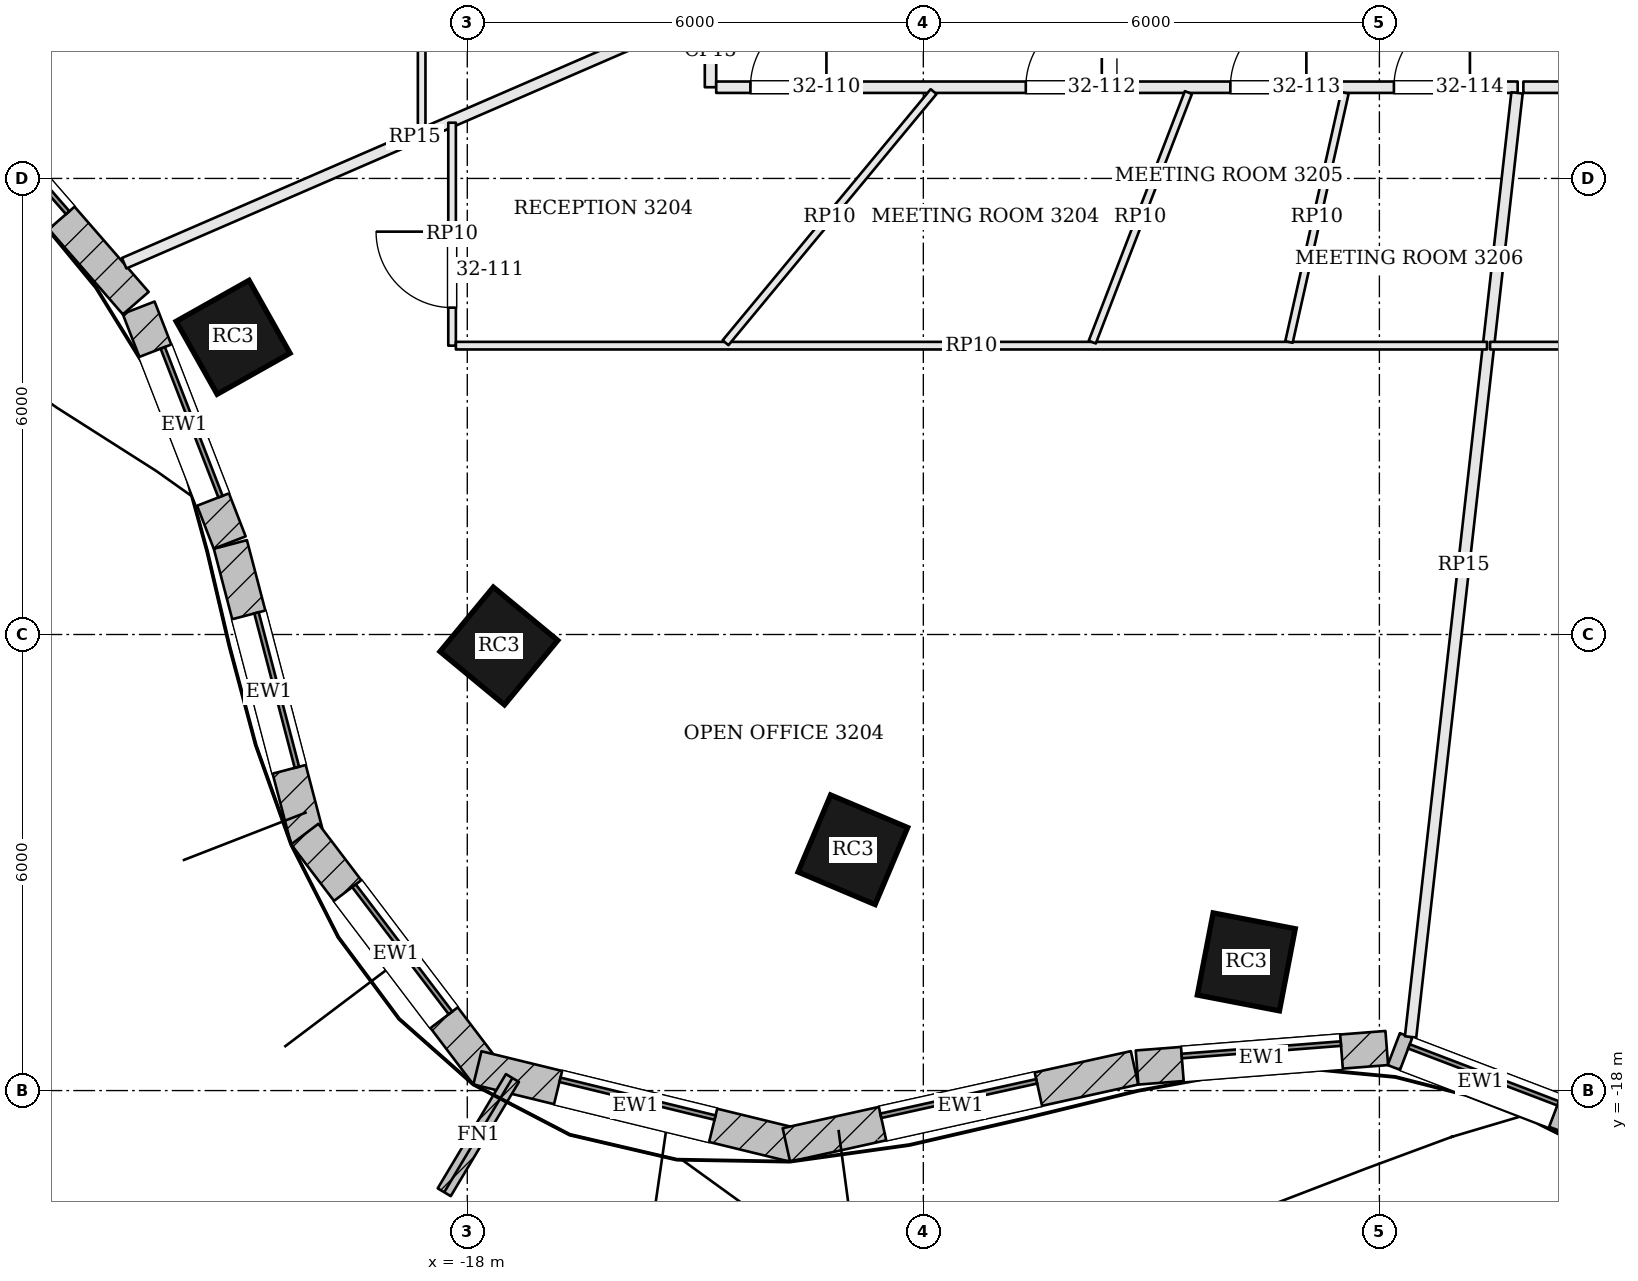
"""IFC4 building model, lengths in metres.
Left out: names, types, materials, properties, quantities, classifications, styles, units other than length and angle.
Written with IfcOpenShell. Run it as: python <this file> out.ifc"""

import sys

from ifc_helpers import new_model, si_unit, direction, frame, frame_2d, origin, origin_2d, place, context, subcontext, project, spatial, rectangle, extrude, element, fill, save


model = new_model("IFC4")
c1 = context("Model", 3, precision=1e-05, world=origin(), true_north=direction((0.0, 1.0)))
c2 = subcontext(c1, "Body", "Model", "MODEL_VIEW")
j1 = project(units=[si_unit("LENGTHUNIT", "METRE"), si_unit("PLANEANGLEUNIT", "RADIAN")], contexts=[c1])
p1 = place(None, origin())
s1 = spatial("IfcSite", under=j1, at=p1, CompositionType="ELEMENT")
p2 = place(p1, origin())
s2 = spatial("IfcBuilding", under=s1, at=p2, CompositionType="ELEMENT")
p3 = place(p2, frame((0.0, 0.0, 134.4)))
s3 = spatial("IfcBuildingStorey", under=s2, at=p3, CompositionType="ELEMENT", Elevation=134.4)
for number, where, z_axis, x_axis in (
    (1, (-21.081, -8.09, 0.0), (0.0, 0.0, 1.0), (0.49, -0.872, 0.0)),
    (2, (-17.584, -12.151, 0.0), (0.0, 0.0, 1.0), (0.771, -0.637, 0.0)),
    (3, (-12.927, -14.832, 0.0), (0.0, 0.0, 1.0), (0.921, -0.389, 0.0)),
    (4, (-7.751, -16.307, 0.0), (0.0, 0.0, 1.0), (0.982, -0.189, 0.0)),
):
    element("IfcColumn", number, at=place(p3, frame(where, z_axis=z_axis, x_axis=x_axis)), inside=s3, PredefinedType="COLUMN", context=c2, shape_type="SweptSolid", body=[
        extrude(rectangle(XDim=1.1, YDim=1.1, at=origin_2d()), origin(), (0.0, 0.0, 1.0), 3.9),
    ])
p4 = place(p3, frame((-25.691, -3.815, 0.0), z_axis=(0.0, 0.0, 1.0), x_axis=(0.656552883353, -0.754279995334, 0.0)))
e5 = element("IfcWall", 5, at=p4, inside=s3, PredefinedType="SOLIDWALL", context=c2, shape_type="SweptSolid", body=[
    extrude(rectangle(XDim=5.071, YDim=0.45, at=frame_2d((2.536, 0.0))), origin(), (0.0, 0.0, 1.0), 3.7),
])
p5 = place(p4, frame((1.486, 0.0, 0.9)))
e6 = element("IfcOpeningElement", 6, at=p5, cuts=e5, PredefinedType="OPENING", context=c2, shape_type="SweptSolid", body=[
    extrude(rectangle(XDim=2.1, YDim=2.3, at=frame_2d((1.05, 1.15))), frame((0.0, 0.235, 0.0), z_axis=(0.0, -1.0, 0.0), x_axis=(1.0, 0.0, 0.0)), (0.0, 0.0, 1.0), 0.47),
])
p6 = place(p3, frame((-22.323, -7.701, 0.0), z_axis=(0.0, 0.0, 1.0), x_axis=(0.361550075906, -0.932352692178, 0.0)))
e7 = element("IfcWall", 7, at=p6, inside=s3, PredefinedType="SOLIDWALL", context=c2, shape_type="SweptSolid", body=[
    extrude(rectangle(XDim=3.313, YDim=0.45, at=frame_2d((1.657, 0.0))), origin(), (0.0, 0.0, 1.0), 3.7),
])
p7 = place(p6, frame((0.607, 0.0, 0.9)))
e8 = element("IfcOpeningElement", 8, at=p7, cuts=e7, PredefinedType="OPENING", context=c2, shape_type="SweptSolid", body=[
    extrude(rectangle(XDim=2.1, YDim=2.3, at=frame_2d((1.05, 1.15))), frame((0.0, 0.235, 0.0), z_axis=(0.0, -1.0, 0.0), x_axis=(1.0, 0.0, 0.0)), (0.0, 0.0, 1.0), 0.47),
])
p8 = place(p3, frame((-21.117, -10.815, 0.0), z_axis=(0.0, 0.0, 1.0), x_axis=(0.253065392985, -0.967449175344, 0.0)))
e9 = element("IfcWall", 9, at=p8, inside=s3, PredefinedType="SOLIDWALL", context=c2, shape_type="SweptSolid", body=[
    extrude(rectangle(XDim=4.015, YDim=0.45, at=frame_2d((2.008, 0.0))), origin(), (0.0, 0.0, 1.0), 3.7),
])
p9 = place(p8, frame((0.958, 0.0, 0.9)))
e10 = element("IfcOpeningElement", 10, at=p9, cuts=e9, PredefinedType="OPENING", context=c2, shape_type="SweptSolid", body=[
    extrude(rectangle(XDim=2.1, YDim=2.3, at=frame_2d((1.05, 1.15))), frame((0.0, 0.235, 0.0), z_axis=(0.0, -1.0, 0.0), x_axis=(1.0, 0.0, 0.0)), (0.0, 0.0, 1.0), 0.47),
])
p10 = place(p3, frame((-20.138, -14.626, 0.0), z_axis=(0.0, 0.0, 1.0), x_axis=(0.604591324894, -0.796535830872, 0.0)))
e11 = element("IfcWall", 11, at=p10, inside=s3, PredefinedType="SOLIDWALL", context=c2, shape_type="SweptSolid", body=[
    extrude(rectangle(XDim=3.965, YDim=0.45, at=frame_2d((1.982, 0.0))), origin(), (0.0, 0.0, 1.0), 3.7),
])
p11 = place(p10, frame((0.932, 0.0, 0.9)))
e12 = element("IfcOpeningElement", 12, at=p11, cuts=e11, PredefinedType="OPENING", context=c2, shape_type="SweptSolid", body=[
    extrude(rectangle(XDim=2.1, YDim=2.3, at=frame_2d((1.05, 1.15))), frame((0.0, 0.235, 0.0), z_axis=(0.0, -1.0, 0.0), x_axis=(1.0, 0.0, 0.0)), (0.0, 0.0, 1.0), 0.47),
])
p12 = place(p3, frame((-17.867, -17.701, 0.0), z_axis=(0.0, 0.0, 1.0), x_axis=(0.971546885012, -0.236847314156, 0.0)))
e13 = element("IfcWall", 13, at=p12, inside=s3, PredefinedType="SOLIDWALL", context=c2, shape_type="SweptSolid", body=[
    extrude(rectangle(XDim=4.285, YDim=0.45, at=frame_2d((2.143, 0.0))), origin(), (0.0, 0.0, 1.0), 3.7),
])
p13 = place(p12, frame((1.093, 0.0, 0.9)))
e14 = element("IfcOpeningElement", 14, at=p13, cuts=e13, PredefinedType="OPENING", context=c2, shape_type="SweptSolid", body=[
    extrude(rectangle(XDim=2.1, YDim=2.3, at=frame_2d((1.05, 1.15))), frame((0.0, 0.235, 0.0), z_axis=(0.0, -1.0, 0.0), x_axis=(1.0, 0.0, 0.0)), (0.0, 0.0, 1.0), 0.47),
])
p14 = place(p3, frame((-13.802, -18.715, 0.0), z_axis=(0.0, 0.0, 1.0), x_axis=(0.976380129166, 0.216059814331, 0.0)))
e15 = element("IfcWall", 15, at=p14, inside=s3, PredefinedType="SOLIDWALL", context=c2, shape_type="SweptSolid", body=[
    extrude(rectangle(XDim=4.692, YDim=0.45, at=frame_2d((2.346, 0.0))), origin(), (0.0, 0.0, 1.0), 3.7),
])
p15 = place(p14, frame((1.296, 0.0, 0.9)))
e16 = element("IfcOpeningElement", 16, at=p15, cuts=e15, PredefinedType="OPENING", context=c2, shape_type="SweptSolid", body=[
    extrude(rectangle(XDim=2.1, YDim=2.3, at=frame_2d((1.05, 1.15))), frame((0.0, 0.235, 0.0), z_axis=(0.0, -1.0, 0.0), x_axis=(1.0, 0.0, 0.0)), (0.0, 0.0, 1.0), 0.47),
])
p16 = place(p3, frame((-9.188, -17.697, 0.0), z_axis=(0.0, 0.0, 1.0), x_axis=(0.996964028691, 0.077863505548, 0.0)))
e17 = element("IfcWall", 17, at=p16, inside=s3, PredefinedType="SOLIDWALL", context=c2, shape_type="SweptSolid", body=[
    extrude(rectangle(XDim=3.295, YDim=0.45, at=frame_2d((1.648, 0.0))), origin(), (0.0, 0.0, 1.0), 3.7),
])
p17 = place(p16, frame((0.598, 0.0, 0.9)))
e18 = element("IfcOpeningElement", 18, at=p17, cuts=e17, PredefinedType="OPENING", context=c2, shape_type="SweptSolid", body=[
    extrude(rectangle(XDim=2.1, YDim=2.3, at=frame_2d((1.05, 1.15))), frame((0.0, 0.235, 0.0), z_axis=(0.0, -1.0, 0.0), x_axis=(1.0, 0.0, 0.0)), (0.0, 0.0, 1.0), 0.47),
])
p18 = place(p3, frame((-5.811, -17.455, 0.0), z_axis=(0.0, 0.0, 1.0), x_axis=(0.934122271306, -0.35695319336, 0.0)))
e19 = element("IfcWall", 19, at=p18, inside=s3, PredefinedType="SOLIDWALL", context=c2, shape_type="SweptSolid", body=[
    extrude(rectangle(XDim=2.448, YDim=0.45, at=frame_2d((1.224, 0.0))), origin(), (0.0, 0.0, 1.0), 3.7),
])
p19 = place(p18, frame((0.174, 0.0, 0.9)))
e20 = element("IfcOpeningElement", 20, at=p19, cuts=e19, PredefinedType="OPENING", context=c2, shape_type="SweptSolid", body=[
    extrude(rectangle(XDim=2.1, YDim=2.3, at=frame_2d((1.05, 1.15))), frame((0.0, 0.235, 0.0), z_axis=(0.0, -1.0, 0.0), x_axis=(1.0, 0.0, 0.0)), (0.0, 0.0, 1.0), 0.47),
])
p20 = place(p3, frame((-17.406, -17.835, 0.0), z_axis=(0.0, 0.0, 1.0), x_axis=(-0.512648290506, -0.858598701514, 0.0)))
e21 = element("IfcWall", 21, at=p20, inside=s3, PredefinedType="SOLIDWALL", context=c2, shape_type="SweptSolid", body=[
    extrude(rectangle(XDim=1.75, YDim=0.2, at=frame_2d((0.875, 0.0))), origin(), (0.0, 0.0, 1.0), 3.7),
])
p21 = place(p3, frame((-22.514, -7.116, 0.0), z_axis=(0.0, 0.0, 1.0), x_axis=(0.917457618692, 0.397833530392, 0.0)))
e22 = element("IfcWall", 22, at=p21, inside=s3, PredefinedType="PARTITIONING", context=c2, shape_type="SweptSolid", body=[
    extrude(rectangle(XDim=8.333, YDim=0.15, at=frame_2d((4.167, 0.0))), origin(), (0.0, 0.0, 1.0), 3.198),
])
p22 = place(p3, frame((-14.8, -3.846, 0.0), z_axis=(0.0, 0.0, 1.0), x_axis=(0.0, -1.0, 0.0)))
e23 = element("IfcWall", 23, at=p22, inside=s3, PredefinedType="PARTITIONING", context=c2, shape_type="SweptSolid", body=[
    extrude(rectangle(XDim=0.954, YDim=0.15, at=frame_2d((0.477, 0.0))), origin(), (0.0, 0.0, 1.0), 3.198),
])
p23 = place(p3, frame((-14.725, -4.8, 0.0), z_axis=(0.0, 0.0, 1.0), x_axis=(1.0, 0.0, 0.0)))
e24 = element("IfcWall", 24, at=p23, inside=s3, PredefinedType="PARTITIONING", context=c2, shape_type="SweptSolid", body=[
    extrude(rectangle(XDim=10.544, YDim=0.15, at=frame_2d((5.272, 0.0))), origin(), (0.0, 0.0, 1.0), 3.198),
])
p24 = place(p23, frame((0.45, 0.0, 0.0)))
e25 = element("IfcOpeningElement", 25, at=p24, cuts=e24, PredefinedType="OPENING", context=c2, shape_type="SweptSolid", body=[
    extrude(rectangle(XDim=1.0, YDim=2.1, at=frame_2d((0.5, 1.05))), frame((0.0, 0.085, 0.0), z_axis=(0.0, -1.0, 0.0), x_axis=(1.0, 0.0, 0.0)), (0.0, 0.0, 1.0), 0.17),
])
p25 = place(p23, frame((4.073, 0.0, 0.0)))
e26 = element("IfcOpeningElement", 26, at=p25, cuts=e24, PredefinedType="OPENING", context=c2, shape_type="SweptSolid", body=[
    extrude(rectangle(XDim=1.0, YDim=2.4, at=frame_2d((0.5, 1.2))), frame((0.0, 0.085, 0.0), z_axis=(0.0, -1.0, 0.0), x_axis=(1.0, 0.0, 0.0)), (0.0, 0.0, 1.0), 0.17),
])
p26 = place(p23, frame((6.764, 0.0, 0.0)))
e27 = element("IfcOpeningElement", 27, at=p26, cuts=e24, PredefinedType="OPENING", context=c2, shape_type="SweptSolid", body=[
    extrude(rectangle(XDim=1.0, YDim=2.4, at=frame_2d((0.5, 1.2))), frame((0.0, 0.085, 0.0), z_axis=(0.0, -1.0, 0.0), x_axis=(1.0, 0.0, 0.0)), (0.0, 0.0, 1.0), 0.17),
])
p27 = place(p23, frame((8.916, 0.0, 0.0)))
e28 = element("IfcOpeningElement", 28, at=p27, cuts=e24, PredefinedType="OPENING", context=c2, shape_type="SweptSolid", body=[
    extrude(rectangle(XDim=1.0, YDim=2.4, at=frame_2d((0.5, 1.2))), frame((0.0, 0.085, 0.0), z_axis=(0.0, -1.0, 0.0), x_axis=(1.0, 0.0, 0.0)), (0.0, 0.0, 1.0), 0.17),
])
p28 = place(p3, frame((-5.59, -17.294, 0.0), z_axis=(0.0, 0.0, 1.0), x_axis=(0.112047950982, 0.993702800983, 0.0)))
e29 = element("IfcWall", 29, at=p28, inside=s3, PredefinedType="PARTITIONING", context=c2, shape_type="SweptSolid", body=[
    extrude(rectangle(XDim=12.498, YDim=0.15, at=frame_2d((6.249, 0.0))), origin(), (0.0, 0.0, 1.0), 3.198),
])
p29 = place(p3, frame((-4.106, -4.8, 0.0), z_axis=(0.0, 0.0, 1.0), x_axis=(1.0, 0.0, 0.0)))
e30 = element("IfcWall", 30, at=p29, inside=s3, PredefinedType="PARTITIONING", context=c2, shape_type="SweptSolid", body=[
    extrude(rectangle(XDim=14.117, YDim=0.15, at=frame_2d((7.059, 0.0))), origin(), (0.0, 0.0, 1.0), 3.198),
])
p30 = place(p29, frame((2.396, 0.0, 0.0)))
e31 = element("IfcOpeningElement", 31, at=p30, cuts=e30, PredefinedType="OPENING", context=c2, shape_type="SweptSolid", body=[
    extrude(rectangle(XDim=1.8, YDim=2.1, at=frame_2d((0.9, 1.05))), frame((0.0, 0.085, 0.0), z_axis=(0.0, -1.0, 0.0), x_axis=(1.0, 0.0, 0.0)), (0.0, 0.0, 1.0), 0.17),
])
p31 = place(p29, frame((8.053, 0.0, 0.0)))
e32 = element("IfcOpeningElement", 32, at=p31, cuts=e30, PredefinedType="OPENING", context=c2, shape_type="SweptSolid", body=[
    extrude(rectangle(XDim=1.0, YDim=2.4, at=frame_2d((0.5, 1.2))), frame((0.0, 0.085, 0.0), z_axis=(0.0, -1.0, 0.0), x_axis=(1.0, 0.0, 0.0)), (0.0, 0.0, 1.0), 0.17),
])
p32 = place(p3, frame((-18.6, -5.397, 0.0), z_axis=(0.0, 0.0, 1.0), x_axis=(0.0, 1.0, 0.0)))
e33 = element("IfcWall", 33, at=p32, inside=s3, PredefinedType="PARTITIONING", context=c2, shape_type="SweptSolid", body=[
    extrude(rectangle(XDim=16.919, YDim=0.1, at=frame_2d((8.459, 0.0))), origin(), (0.0, 0.0, 1.0), 3.184),
])
p33 = place(p32, frame((1.975, 0.0, 0.0)))
e34 = element("IfcOpeningElement", 34, at=p33, cuts=e33, PredefinedType="OPENING", context=c2, shape_type="SweptSolid", body=[
    extrude(rectangle(XDim=0.9, YDim=2.1, at=frame_2d((0.45, 1.05))), frame((0.0, 0.06, 0.0), z_axis=(0.0, -1.0, 0.0), x_axis=(1.0, 0.0, 0.0)), (0.0, 0.0, 1.0), 0.12),
])
p34 = place(p32, frame((7.95, 0.0, 0.0)))
e35 = element("IfcOpeningElement", 35, at=p34, cuts=e33, PredefinedType="OPENING", context=c2, shape_type="SweptSolid", body=[
    extrude(rectangle(XDim=1.0, YDim=2.4, at=frame_2d((0.5, 1.2))), frame((0.0, 0.06, 0.0), z_axis=(0.0, -1.0, 0.0), x_axis=(1.0, 0.0, 0.0)), (0.0, 0.0, 1.0), 0.12),
])
p35 = place(p3, frame((-18.2, -8.2, 0.0), z_axis=(0.0, 0.0, 1.0), x_axis=(0.0, 1.0, 0.0)))
e36 = element("IfcWall", 36, at=p35, inside=s3, PredefinedType="PARTITIONING", context=c2, shape_type="SweptSolid", body=[
    extrude(rectangle(XDim=2.933, YDim=0.1, at=frame_2d((1.467, 0.0))), origin(), (0.0, 0.0, 1.0), 3.184),
])
p36 = place(p35, frame((0.5, 0.0, 0.0)))
e37 = element("IfcOpeningElement", 37, at=p36, cuts=e36, PredefinedType="OPENING", context=c2, shape_type="SweptSolid", body=[
    extrude(rectangle(XDim=1.0, YDim=2.1, at=frame_2d((0.5, 1.05))), frame((0.0, 0.06, 0.0), z_axis=(0.0, -1.0, 0.0), x_axis=(1.0, 0.0, 0.0)), (0.0, 0.0, 1.0), 0.12),
])
p37 = place(p3, frame((-4.584, -8.2, 0.0), z_axis=(0.0, 0.0, 1.0), x_axis=(-1.0, 0.0, 0.0)))
e38 = element("IfcWall", 38, at=p37, inside=s3, PredefinedType="PARTITIONING", context=c2, shape_type="SweptSolid", body=[
    extrude(rectangle(XDim=13.566, YDim=0.1, at=frame_2d((6.783, 0.0))), origin(), (0.0, 0.0, 1.0), 3.184),
])
p38 = place(p3, frame((-11.865, -4.858, 0.0), z_axis=(0.0, 0.0, 1.0), x_axis=(-0.638010152626, -0.770027950886, 0.0)))
e39 = element("IfcWall", 39, at=p38, inside=s3, PredefinedType="PARTITIONING", context=c2, shape_type="SweptSolid", body=[
    extrude(rectangle(XDim=4.29, YDim=0.1, at=frame_2d((2.145, 0.0))), origin(), (0.0, 0.0, 1.0), 3.184),
])
p39 = place(p3, frame((-8.513, -4.87, 0.0), z_axis=(0.0, 0.0, 1.0), x_axis=(-0.359444024243, -0.933166648266, 0.0)))
e40 = element("IfcWall", 40, at=p39, inside=s3, PredefinedType="PARTITIONING", context=c2, shape_type="SweptSolid", body=[
    extrude(rectangle(XDim=3.518, YDim=0.1, at=frame_2d((1.759, 0.0))), origin(), (0.0, 0.0, 1.0), 3.184),
])
p40 = place(p3, frame((-6.453, -4.873, 0.0), z_axis=(0.0, 0.0, 1.0), x_axis=(-0.21917670953, -0.975685179758, 0.0)))
e41 = element("IfcWall", 41, at=p40, inside=s3, PredefinedType="PARTITIONING", context=c2, shape_type="SweptSolid", body=[
    extrude(rectangle(XDim=3.36, YDim=0.1, at=frame_2d((1.68, 0.0))), origin(), (0.0, 0.0, 1.0), 3.184),
])
p41 = place(p3, frame((11.76, -8.2, 0.0), z_axis=(0.0, 0.0, 1.0), x_axis=(-1.0, 0.0, 0.0)))
e42 = element("IfcWall", 42, at=p41, inside=s3, PredefinedType="PARTITIONING", context=c2, shape_type="SweptSolid", body=[
    extrude(rectangle(XDim=16.305, YDim=0.1, at=frame_2d((8.152, 0.0))), origin(), (0.0, 0.0, 1.0), 3.184),
])
p42 = place(p41, frame((11.985, 0.0, 0.0)))
e43 = element("IfcOpeningElement", 43, at=p42, cuts=e42, PredefinedType="OPENING", context=c2, shape_type="SweptSolid", body=[
    extrude(rectangle(XDim=1.0, YDim=2.1, at=frame_2d((0.5, 1.05))), frame((0.0, 0.06, 0.0), z_axis=(0.0, -1.0, 0.0), x_axis=(1.0, 0.0, 0.0)), (0.0, 0.0, 1.0), 0.12),
])
p43 = place(p41, frame((1.674, 0.0, 0.0)))
e44 = element("IfcOpeningElement", 44, at=p43, cuts=e42, PredefinedType="OPENING", context=c2, shape_type="SweptSolid", body=[
    extrude(rectangle(XDim=0.9, YDim=2.1, at=frame_2d((0.45, 1.05))), frame((0.0, 0.06, 0.0), z_axis=(0.0, -1.0, 0.0), x_axis=(1.0, 0.0, 0.0)), (0.0, 0.0, 1.0), 0.12),
])
p44 = place(p5, origin())
e45 = element("IfcWindow", 45, at=p44, inside=s3, PartitioningType="SINGLE_PANEL", PredefinedType="WINDOW", context=c2, shape_type="SweptSolid", body=[
    extrude(rectangle(XDim=2.1, YDim=2.3, at=frame_2d((1.05, 1.15))), frame((0.0, 0.135, 0.0), z_axis=(0.0, -1.0, 0.0), x_axis=(1.0, 0.0, 0.0)), (0.0, 0.0, 1.0), 0.06),
])
fill(e6, e45)
p45 = place(p7, origin())
e46 = element("IfcWindow", 46, at=p45, inside=s3, PartitioningType="SINGLE_PANEL", PredefinedType="WINDOW", context=c2, shape_type="SweptSolid", body=[
    extrude(rectangle(XDim=2.1, YDim=2.3, at=frame_2d((1.05, 1.15))), frame((0.0, 0.135, 0.0), z_axis=(0.0, -1.0, 0.0), x_axis=(1.0, 0.0, 0.0)), (0.0, 0.0, 1.0), 0.06),
])
fill(e8, e46)
p46 = place(p9, origin())
e47 = element("IfcWindow", 47, at=p46, inside=s3, PartitioningType="SINGLE_PANEL", PredefinedType="WINDOW", context=c2, shape_type="SweptSolid", body=[
    extrude(rectangle(XDim=2.1, YDim=2.3, at=frame_2d((1.05, 1.15))), frame((0.0, 0.135, 0.0), z_axis=(0.0, -1.0, 0.0), x_axis=(1.0, 0.0, 0.0)), (0.0, 0.0, 1.0), 0.06),
])
fill(e10, e47)
p47 = place(p11, origin())
e48 = element("IfcWindow", 48, at=p47, inside=s3, PartitioningType="SINGLE_PANEL", PredefinedType="WINDOW", context=c2, shape_type="SweptSolid", body=[
    extrude(rectangle(XDim=2.1, YDim=2.3, at=frame_2d((1.05, 1.15))), frame((0.0, 0.135, 0.0), z_axis=(0.0, -1.0, 0.0), x_axis=(1.0, 0.0, 0.0)), (0.0, 0.0, 1.0), 0.06),
])
fill(e12, e48)
p48 = place(p13, origin())
e49 = element("IfcWindow", 49, at=p48, inside=s3, PartitioningType="SINGLE_PANEL", PredefinedType="WINDOW", context=c2, shape_type="SweptSolid", body=[
    extrude(rectangle(XDim=2.1, YDim=2.3, at=frame_2d((1.05, 1.15))), frame((0.0, 0.135, 0.0), z_axis=(0.0, -1.0, 0.0), x_axis=(1.0, 0.0, 0.0)), (0.0, 0.0, 1.0), 0.06),
])
fill(e14, e49)
p49 = place(p15, origin())
e50 = element("IfcWindow", 50, at=p49, inside=s3, PartitioningType="SINGLE_PANEL", PredefinedType="WINDOW", context=c2, shape_type="SweptSolid", body=[
    extrude(rectangle(XDim=2.1, YDim=2.3, at=frame_2d((1.05, 1.15))), frame((0.0, 0.135, 0.0), z_axis=(0.0, -1.0, 0.0), x_axis=(1.0, 0.0, 0.0)), (0.0, 0.0, 1.0), 0.06),
])
fill(e16, e50)
p50 = place(p17, origin())
e51 = element("IfcWindow", 51, at=p50, inside=s3, PartitioningType="SINGLE_PANEL", PredefinedType="WINDOW", context=c2, shape_type="SweptSolid", body=[
    extrude(rectangle(XDim=2.1, YDim=2.3, at=frame_2d((1.05, 1.15))), frame((0.0, 0.135, 0.0), z_axis=(0.0, -1.0, 0.0), x_axis=(1.0, 0.0, 0.0)), (0.0, 0.0, 1.0), 0.06),
])
fill(e18, e51)
p51 = place(p19, origin())
e52 = element("IfcWindow", 52, at=p51, inside=s3, PartitioningType="SINGLE_PANEL", PredefinedType="WINDOW", context=c2, shape_type="SweptSolid", body=[
    extrude(rectangle(XDim=2.1, YDim=2.3, at=frame_2d((1.05, 1.15))), frame((0.0, 0.135, 0.0), z_axis=(0.0, -1.0, 0.0), x_axis=(1.0, 0.0, 0.0)), (0.0, 0.0, 1.0), 0.06),
])
fill(e20, e52)
p52 = place(p24, origin())
e53 = element("IfcDoor", 53, at=p52, inside=s3, OperationType="SINGLE_SWING_RIGHT", PredefinedType="DOOR", context=c2, shape_type="SweptSolid", body=[
    extrude(rectangle(XDim=1.0, YDim=2.1, at=frame_2d((0.5, 1.05))), frame((0.0, 0.025, 0.0), z_axis=(0.0, -1.0, 0.0), x_axis=(1.0, 0.0, 0.0)), (0.0, 0.0, 1.0), 0.05),
])
fill(e25, e53)
p53 = place(p36, origin())
e54 = element("IfcDoor", 54, at=p53, inside=s3, OperationType="SINGLE_SWING_RIGHT", PredefinedType="DOOR", context=c2, shape_type="SweptSolid", body=[
    extrude(rectangle(XDim=1.0, YDim=2.1, at=frame_2d((0.5, 1.05))), frame((0.0, 0.025, 0.0), z_axis=(0.0, -1.0, 0.0), x_axis=(1.0, 0.0, 0.0)), (0.0, 0.0, 1.0), 0.05),
])
fill(e37, e54)
p54 = place(p25, origin())
e55 = element("IfcDoor", 55, at=p54, inside=s3, OperationType="SINGLE_SWING_RIGHT", PredefinedType="DOOR", context=c2, shape_type="SweptSolid", body=[
    extrude(rectangle(XDim=1.0, YDim=2.4, at=frame_2d((0.5, 1.2))), frame((0.0, 0.025, 0.0), z_axis=(0.0, -1.0, 0.0), x_axis=(1.0, 0.0, 0.0)), (0.0, 0.0, 1.0), 0.05),
])
fill(e26, e55)
p55 = place(p26, origin())
e56 = element("IfcDoor", 56, at=p55, inside=s3, OperationType="SINGLE_SWING_RIGHT", PredefinedType="DOOR", context=c2, shape_type="SweptSolid", body=[
    extrude(rectangle(XDim=1.0, YDim=2.4, at=frame_2d((0.5, 1.2))), frame((0.0, 0.025, 0.0), z_axis=(0.0, -1.0, 0.0), x_axis=(1.0, 0.0, 0.0)), (0.0, 0.0, 1.0), 0.05),
])
fill(e27, e56)
p56 = place(p27, origin())
e57 = element("IfcDoor", 57, at=p56, inside=s3, OperationType="SINGLE_SWING_RIGHT", PredefinedType="DOOR", context=c2, shape_type="SweptSolid", body=[
    extrude(rectangle(XDim=1.0, YDim=2.4, at=frame_2d((0.5, 1.2))), frame((0.0, 0.025, 0.0), z_axis=(0.0, -1.0, 0.0), x_axis=(1.0, 0.0, 0.0)), (0.0, 0.0, 1.0), 0.05),
])
fill(e28, e57)
save(model, sys.argv[1])
